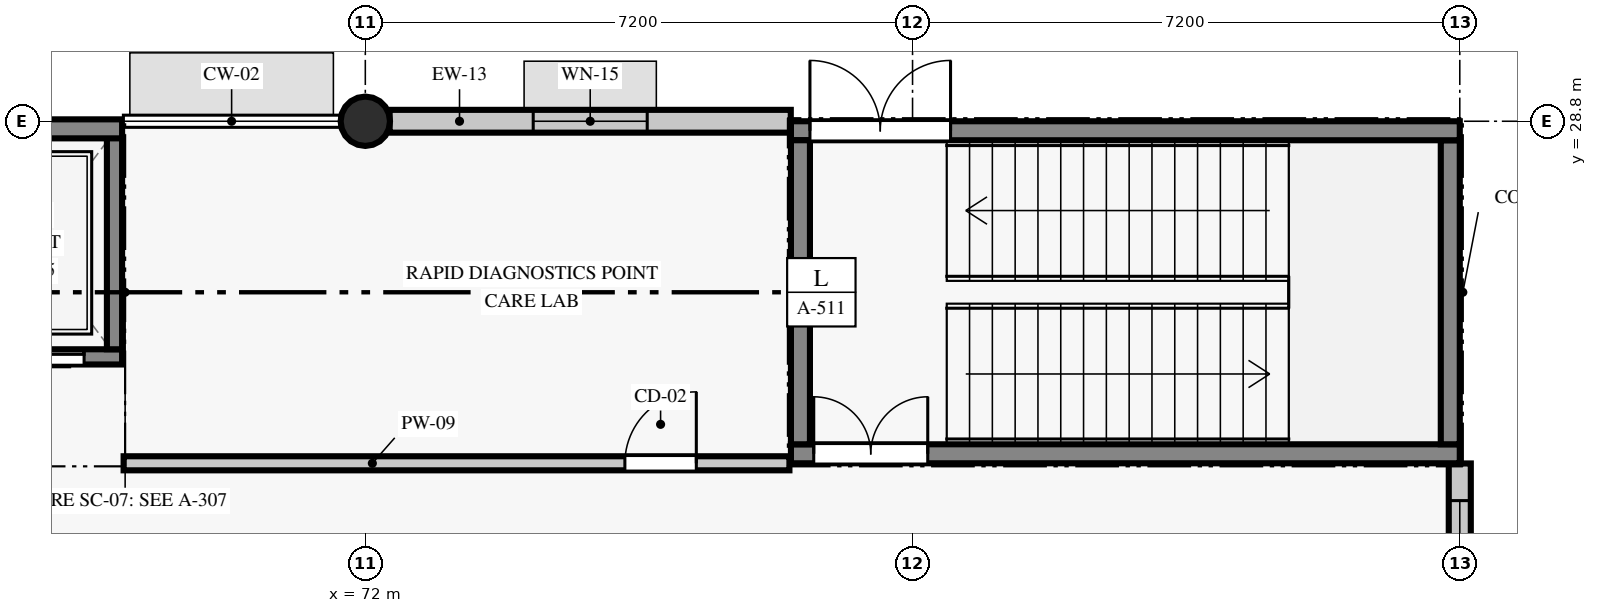
"""IFC4 building model, lengths in metres.
Left out: names, types, materials, properties, quantities, classifications, styles, units other than length and angle.
Written with IfcOpenShell. Run it as: python <this file> out.ifc"""

import sys

from ifc_helpers import new_model, si_unit, direction, frame, frame_2d, origin, origin_2d, place, context, subcontext, project, spatial, rectangle, circle, extrude, element, fill, save


model = new_model("IFC4")
c1 = context("Model", 3, precision=1e-05, world=origin(), true_north=direction((0.0, 1.0)))
c2 = subcontext(c1, "Body", "Model", "MODEL_VIEW")
j1 = project(units=[si_unit("LENGTHUNIT", "METRE"), si_unit("PLANEANGLEUNIT", "RADIAN")], contexts=[c1])
p1 = place(None, origin())
s1 = spatial("IfcSite", under=j1, at=p1, CompositionType="ELEMENT")
p2 = place(p1, origin())
s2 = spatial("IfcBuilding", under=s1, at=p2, CompositionType="ELEMENT")
p3 = place(p2, origin())
s3 = spatial("IfcBuildingStorey", under=s2, at=p3, CompositionType="ELEMENT", Elevation=0.0)
p4 = place(p3, frame((72.0, 28.8, 0.0), z_axis=(0.0, 0.0, 1.0), x_axis=(1.0, 0.0, 0.0)))
e1 = element("IfcColumn", 1, at=p4, inside=s3, PredefinedType="COLUMN", context=c2, shape_type="SweptSolid", body=[
    extrude(circle(Radius=0.325, at=origin_2d()), origin(), (0.0, 0.0, 1.0), 4.51),
])
p5 = place(p3, frame((86.4, 21.92, 0.0), z_axis=(0.0, 0.0, 1.0), x_axis=(0.0, 1.0, 0.0)))
e2 = element("IfcWall", 2, at=p5, inside=s3, PredefinedType="STANDARD", context=c2, shape_type="SweptSolid", body=[
    extrude(rectangle(XDim=2.378, YDim=0.29, at=frame_2d((1.189, 0.0))), origin(), (0.0, 0.0, 1.0), 4.51),
])
p6 = place(p5, frame((0.489, 0.0, 0.9)))
e3 = element("IfcOpeningElement", 3, at=p6, cuts=e2, PredefinedType="OPENING", context=c2, shape_type="SweptSolid", body=[
    extrude(rectangle(XDim=1.4, YDim=1.42, at=frame_2d((0.7, 0.71))), frame((0.0, 0.155, 0.0), z_axis=(0.0, -1.0, 0.0), x_axis=(1.0, 0.0, 0.0)), (0.0, 0.0, 1.0), 0.31),
])
p7 = place(p3, frame((77.598, 28.8, 0.0), z_axis=(0.0, 0.0, 1.0), x_axis=(-1.0, 0.0, 0.0)))
e4 = element("IfcWall", 4, at=p7, inside=s3, PredefinedType="STANDARD", context=c2, shape_type="SweptSolid", body=[
    extrude(rectangle(XDim=5.278, YDim=0.3, at=frame_2d((2.639, 0.0))), origin(), (0.0, 0.0, 1.0), 4.51),
])
p8 = place(p7, frame((1.889, 0.0, 0.9)))
e5 = element("IfcOpeningElement", 5, at=p8, cuts=e4, PredefinedType="OPENING", context=c2, shape_type="SweptSolid", body=[
    extrude(rectangle(XDim=1.5, YDim=1.42, at=frame_2d((0.75, 0.71))), frame((0.0, 0.16, 0.0), z_axis=(0.0, -1.0, 0.0), x_axis=(1.0, 0.0, 0.0)), (0.0, 0.0, 1.0), 0.32),
])
p9 = place(p3, frame((77.6, 24.425, 0.0), z_axis=(0.0, 0.0, 1.0), x_axis=(1.0, 0.0, 0.0)))
e6 = element("IfcWall", 6, at=p9, inside=s3, PredefinedType="SHEAR", context=c2, shape_type="SweptSolid", body=[
    extrude(rectangle(XDim=8.8, YDim=0.25, at=frame_2d((4.4, 0.0))), origin(), (0.0, 0.0, 1.0), 4.51),
])
p10 = place(p9, frame((0.3, 0.0, 0.0)))
e7 = element("IfcOpeningElement", 7, at=p10, cuts=e6, PredefinedType="OPENING", context=c2, shape_type="SweptSolid", body=[
    extrude(rectangle(XDim=1.5, YDim=2.15, at=frame_2d((0.75, 1.075))), frame((0.0, 0.135, 0.0), z_axis=(0.0, -1.0, 0.0), x_axis=(1.0, 0.0, 0.0)), (0.0, 0.0, 1.0), 0.27),
])
p11 = place(p3, frame((86.275, 24.55, 0.0), z_axis=(0.0, 0.0, 1.0), x_axis=(0.0, 1.0, 0.0)))
e8 = element("IfcWall", 8, at=p11, inside=s3, PredefinedType="SHEAR", context=c2, shape_type="SweptSolid", body=[
    extrude(rectangle(XDim=4.0, YDim=0.25, at=frame_2d((2.0, 0.0))), origin(), (0.0, 0.0, 1.0), 4.51),
])
p12 = place(p3, frame((86.4, 28.675, 0.0), z_axis=(0.0, 0.0, 1.0), x_axis=(-1.0, 0.0, 0.0)))
e9 = element("IfcWall", 9, at=p12, inside=s3, PredefinedType="SHEAR", context=c2, shape_type="SweptSolid", body=[
    extrude(rectangle(XDim=8.8, YDim=0.25, at=frame_2d((4.4, 0.0))), origin(), (0.0, 0.0, 1.0), 4.51),
])
p13 = place(p12, frame((6.7, 0.0, 0.0)))
e10 = element("IfcOpeningElement", 10, at=p13, cuts=e9, PredefinedType="OPENING", context=c2, shape_type="SweptSolid", body=[
    extrude(rectangle(XDim=1.85, YDim=2.2, at=frame_2d((0.925, 1.1))), frame((0.0, 0.135, 0.0), z_axis=(0.0, -1.0, 0.0), x_axis=(1.0, 0.0, 0.0)), (0.0, 0.0, 1.0), 0.27),
])
p14 = place(p3, frame((77.725, 28.55, 0.0), z_axis=(0.0, 0.0, 1.0), x_axis=(0.0, -1.0, 0.0)))
e11 = element("IfcWall", 11, at=p14, inside=s3, PredefinedType="SHEAR", context=c2, shape_type="SweptSolid", body=[
    extrude(rectangle(XDim=4.0, YDim=0.25, at=frame_2d((2.0, 0.0))), origin(), (0.0, 0.0, 1.0), 4.51),
])
p15 = place(p3, frame((66.4, 25.7, 0.0), z_axis=(0.0, 0.0, 1.0), x_axis=(1.0, 0.0, 0.0)))
e12 = element("IfcWall", 12, at=p15, inside=s3, PredefinedType="SHEAR", context=c2, shape_type="SweptSolid", body=[
    extrude(rectangle(XDim=2.4, YDim=0.2, at=frame_2d((1.2, 0.0))), origin(), (0.0, 0.0, 1.0), 4.51),
])
p16 = place(p15, frame((0.5, 0.0, 0.0)))
e13 = element("IfcOpeningElement", 13, at=p16, cuts=e12, PredefinedType="OPENING", context=c2, shape_type="SweptSolid", body=[
    extrude(rectangle(XDim=1.4, YDim=2.15, at=frame_2d((0.7, 1.075))), frame((0.0, 0.11, 0.0), z_axis=(0.0, -1.0, 0.0), x_axis=(1.0, 0.0, 0.0)), (0.0, 0.0, 1.0), 0.22),
])
p17 = place(p3, frame((68.7, 25.8, 0.0), z_axis=(0.0, 0.0, 1.0), x_axis=(0.0, 1.0, 0.0)))
e14 = element("IfcWall", 14, at=p17, inside=s3, PredefinedType="SHEAR", context=c2, shape_type="SweptSolid", body=[
    extrude(rectangle(XDim=2.8, YDim=0.2, at=frame_2d((1.4, 0.0))), origin(), (0.0, 0.0, 1.0), 4.51),
])
p18 = place(p3, frame((68.8, 28.7, 0.0), z_axis=(0.0, 0.0, 1.0), x_axis=(-1.0, 0.0, 0.0)))
e15 = element("IfcWall", 15, at=p18, inside=s3, PredefinedType="SHEAR", context=c2, shape_type="SweptSolid", body=[
    extrude(rectangle(XDim=2.4, YDim=0.25, at=frame_2d((1.2, 0.0))), origin(), (0.0, 0.0, 1.0), 4.51),
])
p19 = place(p3, frame((68.82, 24.3, 0.0), z_axis=(0.0, 0.0, 1.0), x_axis=(1.0, 0.0, 0.0)))
e16 = element("IfcWall", 16, at=p19, inside=s3, PredefinedType="PARTITIONING", context=c2, shape_type="SweptSolid", body=[
    extrude(rectangle(XDim=8.76, YDim=0.185, at=frame_2d((4.38, 0.0))), origin(), (0.0, 0.0, 1.0), 3.91),
])
p20 = place(p19, frame((6.595, 0.0, 0.0)))
e17 = element("IfcOpeningElement", 17, at=p20, cuts=e16, PredefinedType="OPENING", context=c2, shape_type="SweptSolid", body=[
    extrude(rectangle(XDim=0.94, YDim=2.08, at=frame_2d((0.47, 1.04))), frame((0.0, 0.103, 0.0), z_axis=(0.0, -1.0, 0.0), x_axis=(1.0, 0.0, 0.0)), (0.0, 0.0, 1.0), 0.205),
])
p21 = place(p6, origin())
e18 = element("IfcWindow", 18, at=p21, inside=s3, PartitioningType="SINGLE_PANEL", PredefinedType="WINDOW", context=c2, shape_type="SweptSolid", body=[
    extrude(rectangle(XDim=1.4, YDim=1.42, at=frame_2d((0.7, 0.71))), frame((0.0, 0.03, 0.0), z_axis=(0.0, -1.0, 0.0), x_axis=(1.0, 0.0, 0.0)), (0.0, 0.0, 1.0), 0.06),
])
fill(e3, e18)
p22 = place(p8, origin())
e19 = element("IfcWindow", 19, at=p22, inside=s3, PartitioningType="SINGLE_PANEL", PredefinedType="WINDOW", context=c2, shape_type="SweptSolid", body=[
    extrude(rectangle(XDim=1.5, YDim=1.42, at=frame_2d((0.75, 0.71))), frame((0.0, 0.03, 0.0), z_axis=(0.0, -1.0, 0.0), x_axis=(1.0, 0.0, 0.0)), (0.0, 0.0, 1.0), 0.06),
])
fill(e5, e19)
p23 = place(p10, origin())
e20 = element("IfcDoor", 20, at=p23, inside=s3, OperationType="DOUBLE_DOOR_SINGLE_SWING", PredefinedType="DOOR", context=c2, shape_type="SweptSolid", body=[
    extrude(rectangle(XDim=1.5, YDim=2.15, at=frame_2d((0.75, 1.075))), frame((0.0, 0.025, 0.0), z_axis=(0.0, -1.0, 0.0), x_axis=(1.0, 0.0, 0.0)), (0.0, 0.0, 1.0), 0.05),
])
fill(e7, e20)
p24 = place(p13, frame((1.85, 0.0, 0.0), z_axis=(0.0, 0.0, 1.0), x_axis=(-1.0, 0.0, 0.0)))
e21 = element("IfcDoor", 21, at=p24, inside=s3, OperationType="DOUBLE_DOOR_SINGLE_SWING", PredefinedType="DOOR", context=c2, shape_type="SweptSolid", body=[
    extrude(rectangle(XDim=1.85, YDim=2.2, at=frame_2d((0.925, 1.1))), frame((0.0, 0.025, 0.0), z_axis=(0.0, -1.0, 0.0), x_axis=(1.0, 0.0, 0.0)), (0.0, 0.0, 1.0), 0.05),
])
fill(e10, e21)
p25 = place(p16, frame((1.4, 0.0, 0.0), z_axis=(0.0, 0.0, 1.0), x_axis=(-1.0, 0.0, 0.0)))
e22 = element("IfcDoor", 22, at=p25, inside=s3, OperationType="DOUBLE_DOOR_SLIDING", PredefinedType="DOOR", context=c2, shape_type="SweptSolid", body=[
    extrude(rectangle(XDim=1.4, YDim=2.15, at=frame_2d((0.7, 1.075))), frame((0.0, 0.025, 0.0), z_axis=(0.0, -1.0, 0.0), x_axis=(1.0, 0.0, 0.0)), (0.0, 0.0, 1.0), 0.05),
])
fill(e13, e22)
p26 = place(p20, origin())
e23 = element("IfcDoor", 23, at=p26, inside=s3, OperationType="SINGLE_SWING_RIGHT", PredefinedType="DOOR", context=c2, shape_type="SweptSolid", body=[
    extrude(rectangle(XDim=0.94, YDim=2.08, at=frame_2d((0.47, 1.04))), frame((0.0, 0.025, 0.0), z_axis=(0.0, -1.0, 0.0), x_axis=(1.0, 0.0, 0.0)), (0.0, 0.0, 1.0), 0.05),
])
fill(e17, e23)
save(model, sys.argv[1])
